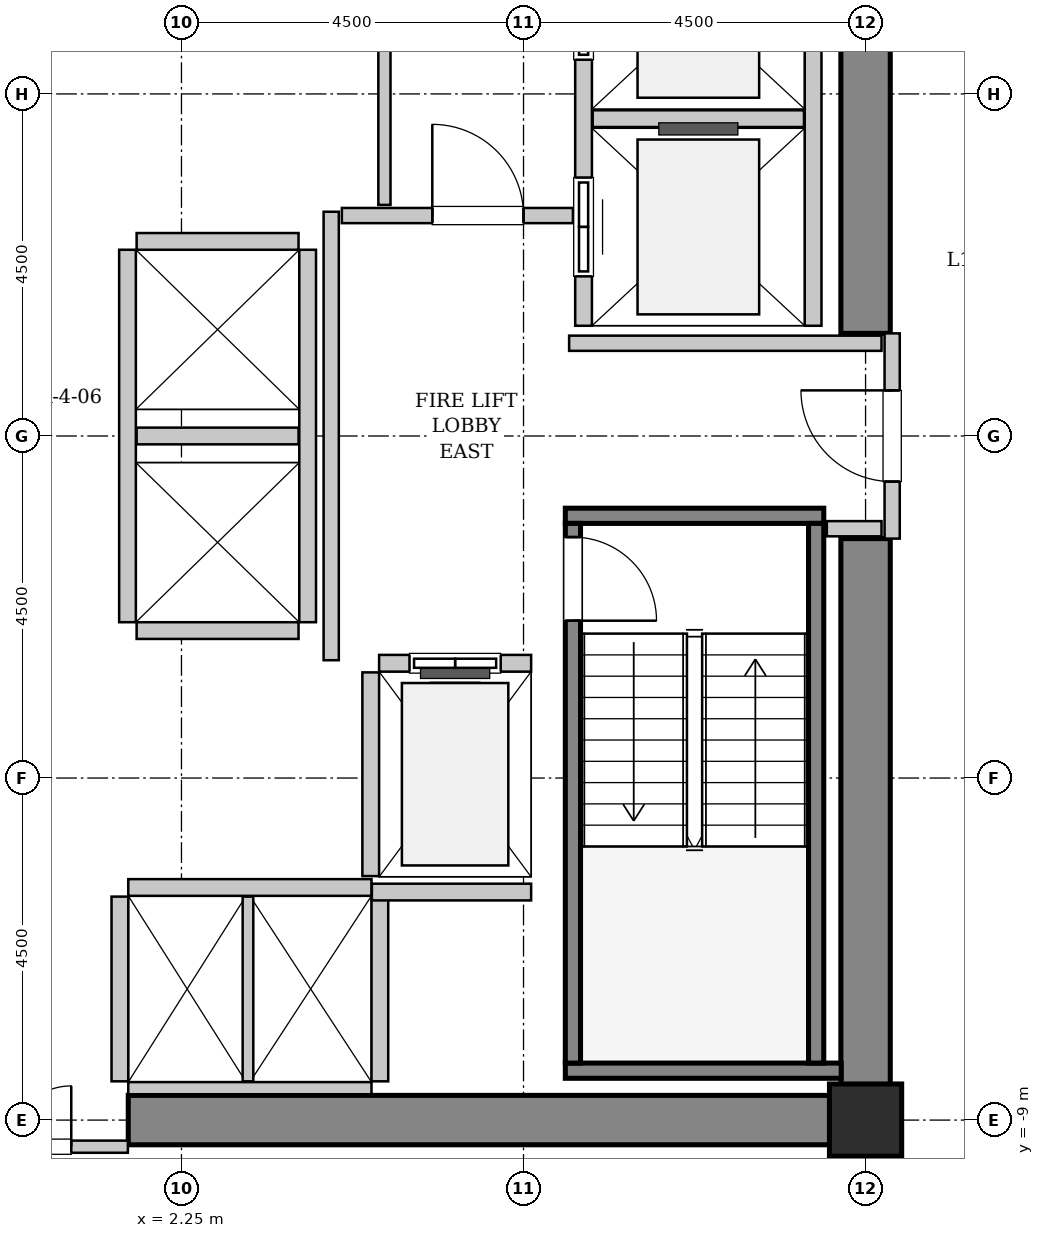
"""IFC4 building model, lengths in metres.
Left out: names, types, materials, properties, quantities, classifications, styles, units other than length and angle.
Written with IfcOpenShell. Run it as: python <this file> out.ifc"""

import sys

from ifc_helpers import new_model, si_unit, direction, frame, frame_2d, origin, origin_2d, place, context, subcontext, project, spatial, rectangle, hollow_rectangle, extrude, source, transform, mapped, element, fill, save


model = new_model("IFC4")
c1 = context("Model", 3, precision=1e-05, world=origin(), true_north=direction((0.0, 1.0)))
c2 = subcontext(c1, "Body", "Model", "MODEL_VIEW")
j1 = project(units=[si_unit("LENGTHUNIT", "METRE"), si_unit("PLANEANGLEUNIT", "RADIAN")], contexts=[c1])
p1 = place(None, origin())
s1 = spatial("IfcSite", under=j1, at=p1, CompositionType="ELEMENT")
p2 = place(p1, origin())
s2 = spatial("IfcBuilding", under=s1, at=p2, CompositionType="ELEMENT")
p3 = place(p2, frame((0.0, 0.0, 67.2)))
s3 = spatial("IfcBuildingStorey", under=s2, at=p3, CompositionType="ELEMENT", Elevation=67.2)
m1 = source(origin(), c2, "Body", "SweptSolid", [
    extrude(rectangle(XDim=10.025, YDim=0.65, at=frame_2d((5.012, 0.0))), origin(), (0.0, 0.0, 1.0), 3.8),
])
p4 = place(p3, frame((1.55, -9.0, 0.0), z_axis=(0.0, 0.0, 1.0), x_axis=(1.0, 0.0, 0.0)))
e1 = element("IfcWall", 1, at=p4, inside=s3, PredefinedType="SHEAR", context=c2, shape_type="MappedRepresentation", body=[
    mapped(m1, transform((0.0, 0.0, 0.0), x_axis=(1.0, 0.0, 0.0), y_axis=(0.0, 1.0, 0.0), z_axis=(0.0, 0.0, 1.0), scale=1.0)),
])
m2 = source(origin(), c2, "Body", "SweptSolid", [
    extrude(rectangle(XDim=7.325, YDim=0.65, at=frame_2d((3.663, 0.0))), origin(), (0.0, 0.0, 1.0), 3.8),
])
for number, where, z_axis, x_axis in (
    (2, (11.25, -8.675, 0.0), (0.0, 0.0, 1.0), (0.0, 1.0, 0.0)),
    (3, (11.25, 1.35, 0.0), (0.0, 0.0, 1.0), (0.0, 1.0, 0.0)),
):
    element("IfcWall", number, at=place(p3, frame(where, z_axis=z_axis, x_axis=x_axis)), inside=s3, PredefinedType="SHEAR", context=c2, shape_type="MappedRepresentation", body=[
        mapped(m2, transform((0.0, 0.0, 0.0), x_axis=(1.0, 0.0, 0.0), y_axis=(0.0, 1.0, 0.0), z_axis=(0.0, 0.0, 1.0), scale=1.0)),
    ])
m3 = source(origin(), c2, "Body", "SweptSolid", [
    extrude(hollow_rectangle(XDim=0.95, YDim=0.95, WallThickness=0.045, InnerFilletRadius=0.045, OuterFilletRadius=0.09, at=origin_2d()), origin(), (0.0, 0.0, 1.0), 3.8),
])
p5 = place(p3, frame((11.25, -9.0, 0.0), z_axis=(0.0, 0.0, 1.0), x_axis=(1.0, 0.0, 0.0)))
e4 = element("IfcColumn", 4, at=p5, inside=s3, PredefinedType="COLUMN", context=c2, shape_type="MappedRepresentation", body=[
    mapped(m3, transform((0.0, 0.0, 0.0), x_axis=(1.0, 0.0, 0.0), y_axis=(0.0, 1.0, 0.0), z_axis=(0.0, 0.0, 1.0), scale=1.0)),
])
m4 = source(origin(), c2, "Body", "SweptSolid", [
    extrude(rectangle(XDim=3.4, YDim=0.2, at=frame_2d((1.7, 0.0))), origin(), (0.0, 0.0, 1.0), 3.8),
])
p6 = place(p3, frame((7.3, -1.05, 0.0), z_axis=(0.0, 0.0, 1.0), x_axis=(1.0, 0.0, 0.0)))
e5 = element("IfcWall", 5, at=p6, inside=s3, PredefinedType="SOLIDWALL", context=c2, shape_type="MappedRepresentation", body=[
    mapped(m4, transform((0.0, 0.0, 0.0), x_axis=(1.0, 0.0, 0.0), y_axis=(0.0, 1.0, 0.0), z_axis=(0.0, 0.0, 1.0), scale=1.0)),
])
m5 = source(origin(), c2, "Body", "SweptSolid", [
    extrude(rectangle(XDim=3.63, YDim=0.2, at=frame_2d((1.815, 0.0))), origin(), (0.0, 0.0, 1.0), 3.8),
])
p7 = place(p3, frame((7.3, -8.35, 0.0), z_axis=(0.0, 0.0, 1.0), x_axis=(1.0, 0.0, 0.0)))
e6 = element("IfcWall", 6, at=p7, inside=s3, PredefinedType="SOLIDWALL", context=c2, shape_type="MappedRepresentation", body=[
    mapped(m5, transform((0.0, 0.0, 0.0), x_axis=(1.0, 0.0, 0.0), y_axis=(0.0, 1.0, 0.0), z_axis=(0.0, 0.0, 1.0), scale=1.0)),
])
m6 = source(origin(), c2, "Body", "SweptSolid", [
    extrude(rectangle(XDim=7.1, YDim=0.2, at=frame_2d((3.55, 0.0))), origin(), (0.0, 0.0, 1.0), 3.8),
])
p8 = place(p3, frame((7.4, -1.15, 0.0), z_axis=(0.0, 0.0, 1.0), x_axis=(0.0, -1.0, 0.0)))
e7 = element("IfcWall", 7, at=p8, inside=s3, PredefinedType="SOLIDWALL", context=c2, shape_type="MappedRepresentation", body=[
    mapped(m6, transform((0.0, 0.0, 0.0), x_axis=(1.0, 0.0, 0.0), y_axis=(0.0, 1.0, 0.0), z_axis=(0.0, 0.0, 1.0), scale=1.0)),
])
p9 = place(p8, frame((0.18, 0.0, 0.0)))
e8 = element("IfcOpeningElement", 8, at=p9, cuts=e7, PredefinedType="OPENING", context=c2, shape_type="SweptSolid", body=[
    extrude(rectangle(XDim=1.1, YDim=2.15, at=frame_2d((0.55, 1.075))), frame((0.0, 0.11, 0.0), z_axis=(0.0, -1.0, 0.0), x_axis=(1.0, 0.0, 0.0)), (0.0, 0.0, 1.0), 0.22),
])
p10 = place(p3, frame((10.6, -1.15, 0.0), z_axis=(0.0, 0.0, 1.0), x_axis=(0.0, -1.0, 0.0)))
e9 = element("IfcWall", 9, at=p10, inside=s3, PredefinedType="SOLIDWALL", context=c2, shape_type="MappedRepresentation", body=[
    mapped(m6, transform((0.0, 0.0, 0.0), x_axis=(1.0, 0.0, 0.0), y_axis=(0.0, 1.0, 0.0), z_axis=(0.0, 0.0, 1.0), scale=1.0)),
])
m7 = source(origin(), c2, "Body", "SweptSolid", [
    extrude(rectangle(XDim=2.0, YDim=0.22, at=frame_2d((1.0, 0.0))), origin(), (0.0, 0.0, 1.0), 3.535),
])
p11 = place(p3, frame((6.85, -2.99, 0.0), z_axis=(0.0, 0.0, 1.0), x_axis=(-1.0, 0.0, 0.0)))
e10 = element("IfcWall", 10, at=p11, inside=s3, PredefinedType="SOLIDWALL", context=c2, shape_type="MappedRepresentation", body=[
    mapped(m7, transform((0.0, 0.0, 0.0), x_axis=(1.0, 0.0, 0.0), y_axis=(0.0, 1.0, 0.0), z_axis=(0.0, 0.0, 1.0), scale=1.0)),
])
p12 = place(p11, frame((0.4, 0.0, 0.0)))
e11 = element("IfcOpeningElement", 11, at=p12, cuts=e10, PredefinedType="OPENING", context=c2, shape_type="SweptSolid", body=[
    extrude(rectangle(XDim=1.2, YDim=2.2, at=frame_2d((0.6, 1.1))), frame((0.0, 0.12, 0.0), z_axis=(0.0, -1.0, 0.0), x_axis=(1.0, 0.0, 0.0)), (0.0, 0.0, 1.0), 0.24),
])
m8 = source(origin(), c2, "Body", "SweptSolid", [
    extrude(rectangle(XDim=2.68, YDim=0.22, at=frame_2d((1.34, 0.0))), origin(), (0.0, 0.0, 1.0), 3.535),
])
p13 = place(p3, frame((4.74, -3.11, 0.0), z_axis=(0.0, 0.0, 1.0), x_axis=(0.0, -1.0, 0.0)))
e12 = element("IfcWall", 12, at=p13, inside=s3, PredefinedType="SOLIDWALL", context=c2, shape_type="MappedRepresentation", body=[
    mapped(m8, transform((0.0, 0.0, 0.0), x_axis=(1.0, 0.0, 0.0), y_axis=(0.0, 1.0, 0.0), z_axis=(0.0, 0.0, 1.0), scale=1.0)),
])
m9 = source(origin(), c2, "Body", "SweptSolid", [
    extrude(rectangle(XDim=5.45, YDim=0.22, at=frame_2d((2.725, 0.0))), origin(), (0.0, 0.0, 1.0), 3.535),
])
p14 = place(p3, frame((7.54, 6.9, 0.0), z_axis=(0.0, 0.0, 1.0), x_axis=(0.0, -1.0, 0.0)))
e13 = element("IfcWall", 13, at=p14, inside=s3, PredefinedType="SOLIDWALL", context=c2, shape_type="MappedRepresentation", body=[
    mapped(m9, transform((0.0, 0.0, 0.0), x_axis=(1.0, 0.0, 0.0), y_axis=(0.0, 1.0, 0.0), z_axis=(0.0, 0.0, 1.0), scale=1.0)),
])
p15 = place(p14, frame((3.5, 0.0, 0.0)))
e14 = element("IfcOpeningElement", 14, at=p15, cuts=e13, PredefinedType="OPENING", context=c2, shape_type="SweptSolid", body=[
    extrude(rectangle(XDim=1.3, YDim=2.3, at=frame_2d((0.65, 1.15))), frame((0.0, 0.12, 0.0), z_axis=(0.0, -1.0, 0.0), x_axis=(1.0, 0.0, 0.0)), (0.0, 0.0, 1.0), 0.24),
])
p16 = place(p14, frame((0.65, 0.0, 0.0)))
e15 = element("IfcOpeningElement", 15, at=p16, cuts=e13, PredefinedType="OPENING", context=c2, shape_type="SweptSolid", body=[
    extrude(rectangle(XDim=1.3, YDim=2.3, at=frame_2d((0.65, 1.15))), frame((0.0, 0.12, 0.0), z_axis=(0.0, -1.0, 0.0), x_axis=(1.0, 0.0, 0.0)), (0.0, 0.0, 1.0), 0.24),
])
p17 = place(p3, frame((10.56, 1.45, 0.0), z_axis=(0.0, 0.0, 1.0), x_axis=(0.0, 1.0, 0.0)))
e16 = element("IfcWall", 16, at=p17, inside=s3, PredefinedType="SOLIDWALL", context=c2, shape_type="MappedRepresentation", body=[
    mapped(m9, transform((0.0, 0.0, 0.0), x_axis=(1.0, 0.0, 0.0), y_axis=(0.0, 1.0, 0.0), z_axis=(0.0, 0.0, 1.0), scale=1.0)),
])
m10 = source(origin(), c2, "Body", "SweptSolid", [
    extrude(rectangle(XDim=2.78, YDim=0.22, at=frame_2d((1.39, 0.0))), origin(), (0.0, 0.0, 1.0), 3.535),
])
p18 = place(p3, frame((7.66, 4.175, 0.0), z_axis=(0.0, 0.0, 1.0), x_axis=(1.0, 0.0, 0.0)))
e17 = element("IfcWall", 17, at=p18, inside=s3, PredefinedType="SOLIDWALL", context=c2, shape_type="MappedRepresentation", body=[
    mapped(m10, transform((0.0, 0.0, 0.0), x_axis=(1.0, 0.0, 0.0), y_axis=(0.0, 1.0, 0.0), z_axis=(0.0, 0.0, 1.0), scale=1.0)),
])
m11 = source(origin(), c2, "Body", "SweptSolid", [
    extrude(rectangle(XDim=3.2, YDim=0.22, at=frame_2d((1.6, 0.0))), origin(), (0.0, 0.0, 1.0), 3.535),
])
p19 = place(p3, frame((4.75, -5.94, 0.0), z_axis=(0.0, 0.0, 1.0), x_axis=(-1.0, 0.0, 0.0)))
e18 = element("IfcWall", 18, at=p19, inside=s3, PredefinedType="SOLIDWALL", context=c2, shape_type="MappedRepresentation", body=[
    mapped(m11, transform((0.0, 0.0, 0.0), x_axis=(1.0, 0.0, 0.0), y_axis=(0.0, 1.0, 0.0), z_axis=(0.0, 0.0, 1.0), scale=1.0)),
])
m12 = source(origin(), c2, "Body", "SweptSolid", [
    extrude(rectangle(XDim=3.2, YDim=0.16, at=frame_2d((1.6, 0.0))), origin(), (0.0, 0.0, 1.0), 2.425),
])
p20 = place(p3, frame((1.55, -8.58, 0.0), z_axis=(0.0, 0.0, 1.0), x_axis=(1.0, 0.0, 0.0)))
e19 = element("IfcWall", 19, at=p20, inside=s3, PredefinedType="PARTITIONING", context=c2, shape_type="MappedRepresentation", body=[
    mapped(m12, transform((0.0, 0.0, 0.0), x_axis=(1.0, 0.0, 0.0), y_axis=(0.0, 1.0, 0.0), z_axis=(0.0, 0.0, 1.0), scale=1.0)),
])
m13 = source(origin(), c2, "Body", "SweptSolid", [
    extrude(rectangle(XDim=2.43, YDim=0.22, at=frame_2d((1.215, 0.0))), origin(), (0.0, 0.0, 1.0), 3.535),
])
p21 = place(p3, frame((1.44, -6.06, 0.0), z_axis=(0.0, 0.0, 1.0), x_axis=(0.0, -1.0, 0.0)))
e20 = element("IfcWall", 20, at=p21, inside=s3, PredefinedType="SOLIDWALL", context=c2, shape_type="MappedRepresentation", body=[
    mapped(m13, transform((0.0, 0.0, 0.0), x_axis=(1.0, 0.0, 0.0), y_axis=(0.0, 1.0, 0.0), z_axis=(0.0, 0.0, 1.0), scale=1.0)),
])
m14 = source(origin(), c2, "Body", "SweptSolid", [
    extrude(rectangle(XDim=2.43, YDim=0.14, at=frame_2d((1.215, 0.0))), origin(), (0.0, 0.0, 1.0), 3.535),
])
p22 = place(p3, frame((3.125, -8.49, 0.0), z_axis=(0.0, 0.0, 1.0), x_axis=(0.0, 1.0, 0.0)))
e21 = element("IfcWall", 21, at=p22, inside=s3, PredefinedType="PARTITIONING", context=c2, shape_type="MappedRepresentation", body=[
    mapped(m14, transform((0.0, 0.0, 0.0), x_axis=(1.0, 0.0, 0.0), y_axis=(0.0, 1.0, 0.0), z_axis=(0.0, 0.0, 1.0), scale=1.0)),
])
p23 = place(p3, frame((4.86, -8.49, 0.0), z_axis=(0.0, 0.0, 1.0), x_axis=(0.0, 1.0, 0.0)))
e22 = element("IfcWall", 22, at=p23, inside=s3, PredefinedType="SOLIDWALL", context=c2, shape_type="MappedRepresentation", body=[
    mapped(m13, transform((0.0, 0.0, 0.0), x_axis=(1.0, 0.0, 0.0), y_axis=(0.0, 1.0, 0.0), z_axis=(0.0, 0.0, 1.0), scale=1.0)),
])
m15 = source(origin(), c2, "Body", "SweptSolid", [
    extrude(rectangle(XDim=4.9, YDim=0.22, at=frame_2d((2.45, 0.0))), origin(), (0.0, 0.0, 1.0), 3.535),
])
for number, where, z_axis, x_axis in (
    (23, (1.54, 2.45, 0.0), (0.0, 0.0, 1.0), (0.0, -1.0, 0.0)),
    (24, (3.91, -2.45, 0.0), (0.0, 0.0, 1.0), (0.0, 1.0, 0.0)),
):
    element("IfcWall", number, at=place(p3, frame(where, z_axis=z_axis, x_axis=x_axis)), inside=s3, PredefinedType="SOLIDWALL", context=c2, shape_type="MappedRepresentation", body=[
        mapped(m15, transform((0.0, 0.0, 0.0), x_axis=(1.0, 0.0, 0.0), y_axis=(0.0, 1.0, 0.0), z_axis=(0.0, 0.0, 1.0), scale=1.0)),
    ])
m16 = source(origin(), c2, "Body", "SweptSolid", [
    extrude(rectangle(XDim=2.13, YDim=0.22, at=frame_2d((1.065, 0.0))), origin(), (0.0, 0.0, 1.0), 3.535),
])
for number, where, z_axis, x_axis in (
    (25, (1.66, -2.56, 0.0), (0.0, 0.0, 1.0), (1.0, 0.0, 0.0)),
    (26, (1.66, 0.0, 0.0), (0.0, 0.0, 1.0), (1.0, 0.0, 0.0)),
    (27, (3.79, 2.56, 0.0), (0.0, 0.0, 1.0), (-1.0, 0.0, 0.0)),
):
    element("IfcWall", number, at=place(p3, frame(where, z_axis=z_axis, x_axis=x_axis)), inside=s3, PredefinedType="SOLIDWALL", context=c2, shape_type="MappedRepresentation", body=[
        mapped(m16, transform((0.0, 0.0, 0.0), x_axis=(1.0, 0.0, 0.0), y_axis=(0.0, 1.0, 0.0), z_axis=(0.0, 0.0, 1.0), scale=1.0)),
    ])
m17 = source(origin(), c2, "Body", "SweptSolid", [
    extrude(rectangle(XDim=2.095, YDim=0.22, at=frame_2d((1.048, 0.0))), origin(), (0.0, 0.0, 1.0), 3.535),
])
p24 = place(p3, frame((4.755, -6.0, 0.0), z_axis=(0.0, 0.0, 1.0), x_axis=(1.0, 0.0, 0.0)))
e28 = element("IfcWall", 28, at=p24, inside=s3, PredefinedType="SOLIDWALL", context=c2, shape_type="MappedRepresentation", body=[
    mapped(m17, transform((0.0, 0.0, 0.0), x_axis=(1.0, 0.0, 0.0), y_axis=(0.0, 1.0, 0.0), z_axis=(0.0, 0.0, 1.0), scale=1.0)),
])
m18 = source(origin(), c2, "Body", "SweptSolid", [
    extrude(rectangle(XDim=2.7, YDim=0.2, at=frame_2d((1.35, 0.0))), origin(), (0.0, 0.0, 1.0), 2.425),
])
p25 = place(p3, frame((11.6, -1.35, 0.0), z_axis=(0.0, 0.0, 1.0), x_axis=(0.0, 1.0, 0.0)))
e29 = element("IfcWall", 29, at=p25, inside=s3, PredefinedType="PARTITIONING", context=c2, shape_type="MappedRepresentation", body=[
    mapped(m18, transform((0.0, 0.0, 0.0), x_axis=(1.0, 0.0, 0.0), y_axis=(0.0, 1.0, 0.0), z_axis=(0.0, 0.0, 1.0), scale=1.0)),
])
p26 = place(p25, frame((0.75, 0.0, 0.0)))
e30 = element("IfcOpeningElement", 30, at=p26, cuts=e29, PredefinedType="OPENING", context=c2, shape_type="SweptSolid", body=[
    extrude(rectangle(XDim=1.2, YDim=2.15, at=frame_2d((0.6, 1.075))), frame((0.0, 0.11, 0.0), z_axis=(0.0, -1.0, 0.0), x_axis=(1.0, 0.0, 0.0)), (0.0, 0.0, 1.0), 0.22),
])
m19 = source(origin(), c2, "Body", "SweptSolid", [
    extrude(rectangle(XDim=5.9, YDim=0.2, at=frame_2d((2.95, 0.0))), origin(), (0.0, 0.0, 1.0), 3.535),
])
p27 = place(p3, frame((4.22, -2.95, 0.0), z_axis=(0.0, 0.0, 1.0), x_axis=(0.0, 1.0, 0.0)))
e31 = element("IfcWall", 31, at=p27, inside=s3, PredefinedType="PARTITIONING", context=c2, shape_type="MappedRepresentation", body=[
    mapped(m19, transform((0.0, 0.0, 0.0), x_axis=(1.0, 0.0, 0.0), y_axis=(0.0, 1.0, 0.0), z_axis=(0.0, 0.0, 1.0), scale=1.0)),
])
m20 = source(origin(), c2, "Body", "SweptSolid", [
    extrude(rectangle(XDim=3.04, YDim=0.2, at=frame_2d((1.52, 0.0))), origin(), (0.0, 0.0, 1.0), 3.535),
])
p28 = place(p3, frame((4.36, 2.9, 0.0), z_axis=(0.0, 0.0, 1.0), x_axis=(1.0, 0.0, 0.0)))
e32 = element("IfcWall", 32, at=p28, inside=s3, PredefinedType="PARTITIONING", context=c2, shape_type="MappedRepresentation", body=[
    mapped(m20, transform((0.0, 0.0, 0.0), x_axis=(1.0, 0.0, 0.0), y_axis=(0.0, 1.0, 0.0), z_axis=(0.0, 0.0, 1.0), scale=1.0)),
])
p29 = place(p28, frame((1.19, 0.0, 0.0)))
e33 = element("IfcOpeningElement", 33, at=p29, cuts=e32, PredefinedType="OPENING", context=c2, shape_type="SweptSolid", body=[
    extrude(rectangle(XDim=1.2, YDim=2.15, at=frame_2d((0.6, 1.075))), frame((0.0, 0.11, 0.0), z_axis=(0.0, -1.0, 0.0), x_axis=(1.0, 0.0, 0.0)), (0.0, 0.0, 1.0), 0.22),
])
m21 = source(origin(), c2, "Body", "SweptSolid", [
    extrude(rectangle(XDim=4.11, YDim=0.2, at=frame_2d((2.055, 0.0))), origin(), (0.0, 0.0, 1.0), 3.535),
])
p30 = place(p3, frame((7.35, 1.22, 0.0), z_axis=(0.0, 0.0, 1.0), x_axis=(1.0, 0.0, 0.0)))
e34 = element("IfcWall", 34, at=p30, inside=s3, PredefinedType="PARTITIONING", context=c2, shape_type="MappedRepresentation", body=[
    mapped(m21, transform((0.0, 0.0, 0.0), x_axis=(1.0, 0.0, 0.0), y_axis=(0.0, 1.0, 0.0), z_axis=(0.0, 0.0, 1.0), scale=1.0)),
])
m22 = source(origin(), c2, "Body", "SweptSolid", [
    extrude(rectangle(XDim=0.72, YDim=0.2, at=frame_2d((0.36, 0.0))), origin(), (0.0, 0.0, 1.0), 3.535),
])
p31 = place(p3, frame((10.74, -1.22, 0.0), z_axis=(0.0, 0.0, 1.0), x_axis=(1.0, 0.0, 0.0)))
e35 = element("IfcWall", 35, at=p31, inside=s3, PredefinedType="PARTITIONING", context=c2, shape_type="MappedRepresentation", body=[
    mapped(m22, transform((0.0, 0.0, 0.0), x_axis=(1.0, 0.0, 0.0), y_axis=(0.0, 1.0, 0.0), z_axis=(0.0, 0.0, 1.0), scale=1.0)),
])
m23 = source(origin(), c2, "Body", "SweptSolid", [
    extrude(rectangle(XDim=3.09, YDim=0.16, at=frame_2d((1.545, 0.0))), origin(), (0.0, 0.0, 1.0), 2.425),
])
p32 = place(p3, frame((-1.545, -9.35, 0.0), z_axis=(0.0, 0.0, 1.0), x_axis=(1.0, 0.0, 0.0)))
e36 = element("IfcWall", 36, at=p32, inside=s3, PredefinedType="PARTITIONING", context=c2, shape_type="MappedRepresentation", body=[
    mapped(m23, transform((0.0, 0.0, 0.0), x_axis=(1.0, 0.0, 0.0), y_axis=(0.0, 1.0, 0.0), z_axis=(0.0, 0.0, 1.0), scale=1.0)),
])
p33 = place(p32, frame((0.745, 0.0, 0.0)))
e37 = element("IfcOpeningElement", 37, at=p33, cuts=e36, PredefinedType="OPENING", context=c2, shape_type="SweptSolid", body=[
    extrude(rectangle(XDim=1.6, YDim=2.3, at=frame_2d((0.8, 1.15))), frame((0.0, 0.09, 0.0), z_axis=(0.0, -1.0, 0.0), x_axis=(1.0, 0.0, 0.0)), (0.0, 0.0, 1.0), 0.18),
])
m24 = source(origin(), c2, "Body", "SweptSolid", [
    extrude(rectangle(XDim=3.015, YDim=0.16, at=frame_2d((1.507, 0.0))), origin(), (0.0, 0.0, 1.0), 3.535),
])
p34 = place(p3, frame((4.92, 3.04, 0.0), z_axis=(0.0, 0.0, 1.0), x_axis=(0.0, 1.0, 0.0)))
e38 = element("IfcWall", 38, at=p34, inside=s3, PredefinedType="PARTITIONING", context=c2, shape_type="MappedRepresentation", body=[
    mapped(m24, transform((0.0, 0.0, 0.0), x_axis=(1.0, 0.0, 0.0), y_axis=(0.0, 1.0, 0.0), z_axis=(0.0, 0.0, 1.0), scale=1.0)),
])
m25 = source(origin(), c2, "Body", "SweptSolid", [
    extrude(rectangle(XDim=1.1, YDim=2.15, at=frame_2d((0.55, 1.075))), frame((0.0, 0.025, 0.0), z_axis=(0.0, -1.0, 0.0), x_axis=(1.0, 0.0, 0.0)), (0.0, 0.0, 1.0), 0.05),
])
p35 = place(p9, origin())
e39 = element("IfcDoor", 39, at=p35, inside=s3, OperationType="SINGLE_SWING_RIGHT", PredefinedType="DOOR", context=c2, shape_type="MappedRepresentation", body=[
    mapped(m25, transform((0.0, 0.0, 0.0), x_axis=(1.0, 0.0, 0.0), y_axis=(0.0, 1.0, 0.0), z_axis=(0.0, 0.0, 1.0), scale=1.0)),
])
fill(e8, e39)
m26 = source(origin(), c2, "Body", "SweptSolid", [
    extrude(rectangle(XDim=1.2, YDim=2.2, at=frame_2d((0.6, 1.1))), frame((0.0, 0.025, 0.0), z_axis=(0.0, -1.0, 0.0), x_axis=(1.0, 0.0, 0.0)), (0.0, 0.0, 1.0), 0.05),
])
p36 = place(p12, origin())
e40 = element("IfcDoor", 40, at=p36, inside=s3, OperationType="SLIDING_TO_LEFT", PredefinedType="DOOR", context=c2, shape_type="MappedRepresentation", body=[
    mapped(m26, transform((0.0, 0.0, 0.0), x_axis=(1.0, 0.0, 0.0), y_axis=(0.0, 1.0, 0.0), z_axis=(0.0, 0.0, 1.0), scale=1.0)),
])
fill(e11, e40)
m27 = source(origin(), c2, "Body", "SweptSolid", [
    extrude(rectangle(XDim=1.3, YDim=2.3, at=frame_2d((0.65, 1.15))), frame((0.0, 0.025, 0.0), z_axis=(0.0, -1.0, 0.0), x_axis=(1.0, 0.0, 0.0)), (0.0, 0.0, 1.0), 0.05),
])
p37 = place(p15, origin())
e41 = element("IfcDoor", 41, at=p37, inside=s3, OperationType="SLIDING_TO_RIGHT", PredefinedType="DOOR", context=c2, shape_type="MappedRepresentation", body=[
    mapped(m27, transform((0.0, 0.0, 0.0), x_axis=(1.0, 0.0, 0.0), y_axis=(0.0, 1.0, 0.0), z_axis=(0.0, 0.0, 1.0), scale=1.0)),
])
fill(e14, e41)
p38 = place(p16, origin())
e42 = element("IfcDoor", 42, at=p38, inside=s3, OperationType="SLIDING_TO_RIGHT", PredefinedType="DOOR", context=c2, shape_type="MappedRepresentation", body=[
    mapped(m27, transform((0.0, 0.0, 0.0), x_axis=(1.0, 0.0, 0.0), y_axis=(0.0, 1.0, 0.0), z_axis=(0.0, 0.0, 1.0), scale=1.0)),
])
fill(e15, e42)
m28 = source(origin(), c2, "Body", "SweptSolid", [
    extrude(rectangle(XDim=1.2, YDim=2.15, at=frame_2d((0.6, 1.075))), frame((0.0, 0.025, 0.0), z_axis=(0.0, -1.0, 0.0), x_axis=(1.0, 0.0, 0.0)), (0.0, 0.0, 1.0), 0.05),
])
p39 = place(p26, origin())
e43 = element("IfcDoor", 43, at=p39, inside=s3, OperationType="SINGLE_SWING_RIGHT", PredefinedType="DOOR", context=c2, shape_type="MappedRepresentation", body=[
    mapped(m28, transform((0.0, 0.0, 0.0), x_axis=(1.0, 0.0, 0.0), y_axis=(0.0, 1.0, 0.0), z_axis=(0.0, 0.0, 1.0), scale=1.0)),
])
fill(e30, e43)
p40 = place(p29, origin())
e44 = element("IfcDoor", 44, at=p40, inside=s3, OperationType="SINGLE_SWING_LEFT", PredefinedType="DOOR", context=c2, shape_type="MappedRepresentation", body=[
    mapped(m28, transform((0.0, 0.0, 0.0), x_axis=(1.0, 0.0, 0.0), y_axis=(0.0, 1.0, 0.0), z_axis=(0.0, 0.0, 1.0), scale=1.0)),
])
fill(e33, e44)
m29 = source(origin(), c2, "Body", "SweptSolid", [
    extrude(rectangle(XDim=1.6, YDim=2.3, at=frame_2d((0.8, 1.15))), frame((0.0, 0.025, 0.0), z_axis=(0.0, -1.0, 0.0), x_axis=(1.0, 0.0, 0.0)), (0.0, 0.0, 1.0), 0.05),
])
p41 = place(p33, origin())
e45 = element("IfcDoor", 45, at=p41, inside=s3, OperationType="DOUBLE_DOOR_SINGLE_SWING", PredefinedType="DOOR", context=c2, shape_type="MappedRepresentation", body=[
    mapped(m29, transform((0.0, 0.0, 0.0), x_axis=(1.0, 0.0, 0.0), y_axis=(0.0, 1.0, 0.0), z_axis=(0.0, 0.0, 1.0), scale=1.0)),
])
fill(e37, e45)
save(model, sys.argv[1])
